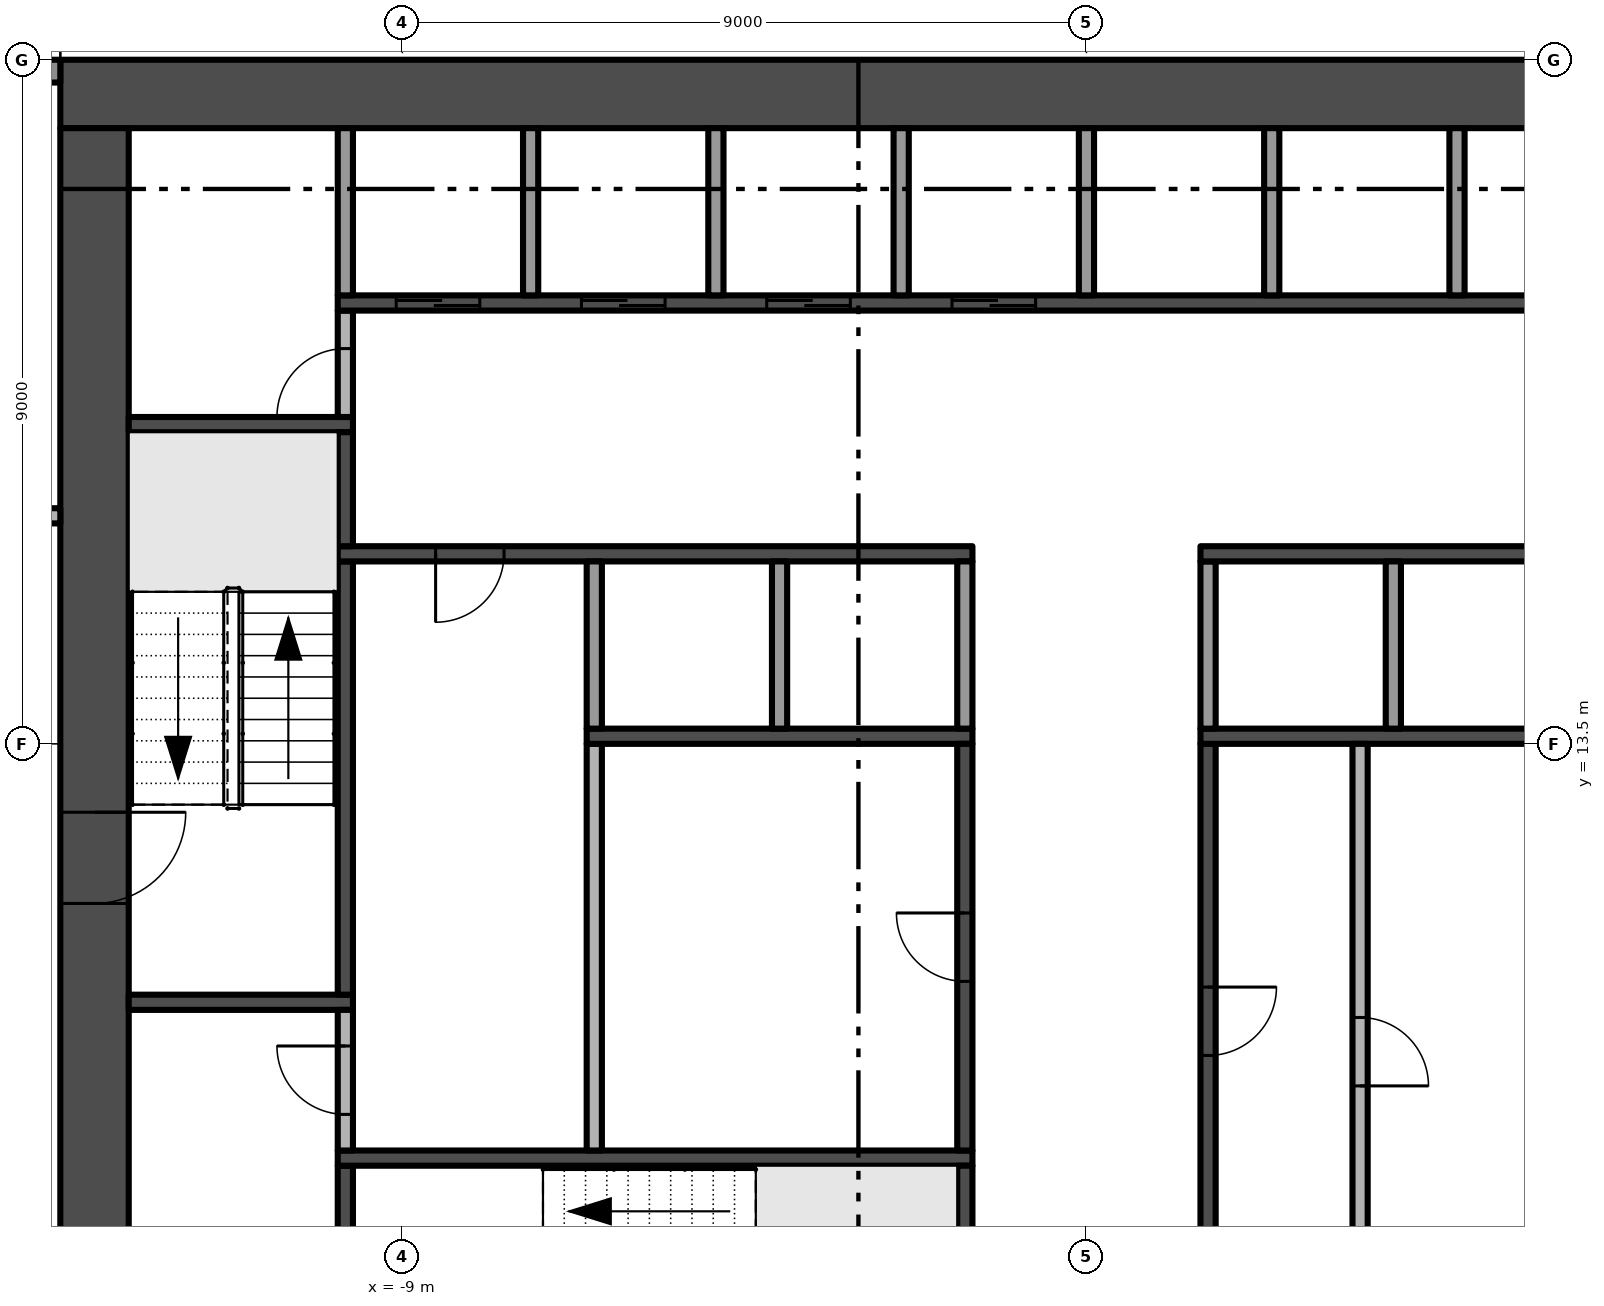
"""IFC4 building model, lengths in metres.
Left out: names, types, materials, properties, quantities, classifications, styles, units other than length and angle.
Written with IfcOpenShell. Run it as: python <this file> out.ifc"""

import sys

from ifc_helpers import new_model, si_unit, direction, frame, frame_2d, origin, place, context, subcontext, project, spatial, rectangle, extrude, element, fill, save


model = new_model("IFC4")
c1 = context("Model", 3, precision=1e-05, world=origin(), true_north=direction((0.0, 1.0)))
c2 = subcontext(c1, "Body", "Model", "MODEL_VIEW")
j1 = project(units=[si_unit("LENGTHUNIT", "METRE"), si_unit("PLANEANGLEUNIT", "RADIAN")], contexts=[c1])
p1 = place(None, origin())
s1 = spatial("IfcSite", under=j1, at=p1, CompositionType="ELEMENT")
p2 = place(p1, origin())
s2 = spatial("IfcBuilding", under=s1, at=p2, CompositionType="ELEMENT")
p3 = place(p2, frame((0.0, 0.0, 56.8)))
s3 = spatial("IfcBuildingStorey", under=s2, at=p3, CompositionType="ELEMENT", Elevation=56.8)
p4 = place(p3, frame((13.5, 22.05, -0.3), z_axis=(0.0, 0.0, 1.0), x_axis=(-1.0, 0.0, 0.0)))
e1 = element("IfcWall", 1, at=p4, inside=s3, PredefinedType="SHEAR", context=c2, shape_type="SweptSolid", body=[
    extrude(rectangle(XDim=27.0, YDim=0.9, at=frame_2d((13.5, 0.0))), origin(), (0.0, 0.0, 1.0), 3.8),
])
p5 = place(p3, frame((-13.05, 21.6, -0.3), z_axis=(0.0, 0.0, 1.0), x_axis=(0.0, -1.0, 0.0)))
e2 = element("IfcWall", 2, at=p5, inside=s3, PredefinedType="SHEAR", context=c2, shape_type="SweptSolid", body=[
    extrude(rectangle(XDim=16.2, YDim=0.9, at=frame_2d((8.1, 0.0))), origin(), (0.0, 0.0, 1.0), 3.8),
])
p6 = place(p5, frame((9.0, 0.0, 0.3)))
e3 = element("IfcOpeningElement", 3, at=p6, cuts=e2, PredefinedType="OPENING", context=c2, shape_type="SweptSolid", body=[
    extrude(rectangle(XDim=1.2, YDim=2.2, at=frame_2d((0.6, 1.1))), frame((0.0, 0.46, 0.0), z_axis=(0.0, -1.0, 0.0), x_axis=(1.0, 0.0, 0.0)), (0.0, 0.0, 1.0), 0.92),
])
p7 = place(p3, frame((-17.3, 22.35, 0.0), z_axis=(0.0, 0.0, 1.0), x_axis=(1.0, 0.0, 0.0)))
e4 = element("IfcWall", 4, at=p7, inside=s3, PredefinedType="SOLIDWALL", context=c2, shape_type="SweptSolid", body=[
    extrude(rectangle(XDim=3.8, YDim=0.3, at=frame_2d((1.9, 0.0))), origin(), (0.0, 0.0, 1.0), 3.5),
])
p8 = place(p7, frame((0.55, 0.0, 0.0)))
e5 = element("IfcOpeningElement", 5, at=p8, cuts=e4, PredefinedType="OPENING", context=c2, shape_type="SweptSolid", body=[
    extrude(rectangle(XDim=2.4, YDim=2.4, at=frame_2d((1.2, 1.2))), frame((0.0, 0.16, 0.0), z_axis=(0.0, -1.0, 0.0), x_axis=(1.0, 0.0, 0.0)), (0.0, 0.0, 1.0), 0.32),
])
for number, where, z_axis, x_axis in (
    (6, (-12.6, 10.1, 0.0), (0.0, 0.0, 1.0), (1.0, 0.0, 0.0)),
    (7, (-12.6, 17.7, 0.0), (0.0, 0.0, 1.0), (1.0, 0.0, 0.0)),
):
    element("IfcWall", number, at=place(p3, frame(where, z_axis=z_axis, x_axis=x_axis)), inside=s3, PredefinedType="SHEAR", context=c2, shape_type="SweptSolid", body=[
        extrude(rectangle(XDim=2.95, YDim=0.2, at=frame_2d((1.475, 0.0))), origin(), (0.0, 0.0, 1.0), 3.5),
    ])
p9 = place(p3, frame((-9.75, 5.4, 0.0), z_axis=(0.0, 0.0, 1.0), x_axis=(0.0, 1.0, 0.0)))
e8 = element("IfcWall", 8, at=p9, inside=s3, PredefinedType="SHEAR", context=c2, shape_type="SweptSolid", body=[
    extrude(rectangle(XDim=2.55, YDim=0.2, at=frame_2d((1.275, 0.0))), origin(), (0.0, 0.0, 1.0), 3.5),
])
p10 = place(p3, frame((-9.85, 8.05, 0.0), z_axis=(0.0, 0.0, 1.0), x_axis=(1.0, 0.0, 0.0)))
e9 = element("IfcWall", 9, at=p10, inside=s3, PredefinedType="SHEAR", context=c2, shape_type="SweptSolid", body=[
    extrude(rectangle(XDim=8.35, YDim=0.2, at=frame_2d((4.175, 0.0))), origin(), (0.0, 0.0, 1.0), 3.5),
])
p11 = place(p3, frame((-9.75, 8.15, 0.0), z_axis=(0.0, 0.0, 1.0), x_axis=(0.0, 1.0, 0.0)))
e10 = element("IfcWall", 10, at=p11, inside=s3, PredefinedType="PARTITIONING", context=c2, shape_type="SweptSolid", body=[
    extrude(rectangle(XDim=1.85, YDim=0.2, at=frame_2d((0.925, 0.0))), origin(), (0.0, 0.0, 1.0), 3.5),
])
p12 = place(p11, frame((0.475, 0.0, 0.0)))
e11 = element("IfcOpeningElement", 11, at=p12, cuts=e10, PredefinedType="OPENING", context=c2, shape_type="SweptSolid", body=[
    extrude(rectangle(XDim=0.9, YDim=2.1, at=frame_2d((0.45, 1.05))), frame((0.0, 0.11, 0.0), z_axis=(0.0, -1.0, 0.0), x_axis=(1.0, 0.0, 0.0)), (0.0, 0.0, 1.0), 0.22),
])
p13 = place(p3, frame((-9.75, 10.2, 0.0), z_axis=(0.0, 0.0, 1.0), x_axis=(0.0, 1.0, 0.0)))
e12 = element("IfcWall", 12, at=p13, inside=s3, PredefinedType="SHEAR", context=c2, shape_type="SweptSolid", body=[
    extrude(rectangle(XDim=5.7, YDim=0.2, at=frame_2d((2.85, 0.0))), origin(), (0.0, 0.0, 1.0), 3.5),
])
p14 = place(p3, frame((-1.5, 16.0, 0.0), z_axis=(0.0, 0.0, 1.0), x_axis=(-1.0, 0.0, 0.0)))
e13 = element("IfcWall", 13, at=p14, inside=s3, PredefinedType="SHEAR", context=c2, shape_type="SweptSolid", body=[
    extrude(rectangle(XDim=8.35, YDim=0.2, at=frame_2d((4.175, 0.0))), origin(), (0.0, 0.0, 1.0), 3.5),
])
p15 = place(p14, frame((6.162, 0.0, 0.0)))
e14 = element("IfcOpeningElement", 14, at=p15, cuts=e13, PredefinedType="OPENING", context=c2, shape_type="SweptSolid", body=[
    extrude(rectangle(XDim=0.9, YDim=2.1, at=frame_2d((0.45, 1.05))), frame((0.0, 0.11, 0.0), z_axis=(0.0, -1.0, 0.0), x_axis=(1.0, 0.0, 0.0)), (0.0, 0.0, 1.0), 0.22),
])
p16 = place(p3, frame((-9.75, 16.1, 0.0), z_axis=(0.0, 0.0, 1.0), x_axis=(0.0, 1.0, 0.0)))
e15 = element("IfcWall", 15, at=p16, inside=s3, PredefinedType="SHEAR", context=c2, shape_type="SweptSolid", body=[
    extrude(rectangle(XDim=1.5, YDim=0.2, at=frame_2d((0.75, 0.0))), origin(), (0.0, 0.0, 1.0), 3.5),
])
p17 = place(p3, frame((-9.75, 17.8, 0.0), z_axis=(0.0, 0.0, 1.0), x_axis=(0.0, 1.0, 0.0)))
e16 = element("IfcWall", 16, at=p17, inside=s3, PredefinedType="PARTITIONING", context=c2, shape_type="SweptSolid", body=[
    extrude(rectangle(XDim=1.4, YDim=0.2, at=frame_2d((0.7, 0.0))), origin(), (0.0, 0.0, 1.0), 3.5),
])
p18 = place(p17, origin())
e17 = element("IfcOpeningElement", 17, at=p18, cuts=e16, PredefinedType="OPENING", context=c2, shape_type="SweptSolid", body=[
    extrude(rectangle(XDim=0.9, YDim=2.1, at=frame_2d((0.45, 1.05))), frame((0.0, 0.11, 0.0), z_axis=(0.0, -1.0, 0.0), x_axis=(1.0, 0.0, 0.0)), (0.0, 0.0, 1.0), 0.22),
])
p19 = place(p3, frame((-9.85, 19.3, 0.0), z_axis=(0.0, 0.0, 1.0), x_axis=(1.0, 0.0, 0.0)))
e18 = element("IfcWall", 18, at=p19, inside=s3, PredefinedType="SHEAR", context=c2, shape_type="SweptSolid", body=[
    extrude(rectangle(XDim=19.7, YDim=0.2, at=frame_2d((9.85, 0.0))), origin(), (0.0, 0.0, 1.0), 3.5),
])
p20 = place(p19, frame((0.769, 0.0, 0.0)))
e19 = element("IfcOpeningElement", 19, at=p20, cuts=e18, PredefinedType="OPENING", context=c2, shape_type="SweptSolid", body=[
    extrude(rectangle(XDim=1.1, YDim=2.1, at=frame_2d((0.55, 1.05))), frame((0.0, 0.11, 0.0), z_axis=(0.0, -1.0, 0.0), x_axis=(1.0, 0.0, 0.0)), (0.0, 0.0, 1.0), 0.22),
])
p21 = place(p19, frame((3.206, 0.0, 0.0)))
e20 = element("IfcOpeningElement", 20, at=p21, cuts=e18, PredefinedType="OPENING", context=c2, shape_type="SweptSolid", body=[
    extrude(rectangle(XDim=1.1, YDim=2.1, at=frame_2d((0.55, 1.05))), frame((0.0, 0.11, 0.0), z_axis=(0.0, -1.0, 0.0), x_axis=(1.0, 0.0, 0.0)), (0.0, 0.0, 1.0), 0.22),
])
p22 = place(p19, frame((5.644, 0.0, 0.0)))
e21 = element("IfcOpeningElement", 21, at=p22, cuts=e18, PredefinedType="OPENING", context=c2, shape_type="SweptSolid", body=[
    extrude(rectangle(XDim=1.1, YDim=2.1, at=frame_2d((0.55, 1.05))), frame((0.0, 0.11, 0.0), z_axis=(0.0, -1.0, 0.0), x_axis=(1.0, 0.0, 0.0)), (0.0, 0.0, 1.0), 0.22),
])
p23 = place(p19, frame((8.081, 0.0, 0.0)))
e22 = element("IfcOpeningElement", 22, at=p23, cuts=e18, PredefinedType="OPENING", context=c2, shape_type="SweptSolid", body=[
    extrude(rectangle(XDim=1.1, YDim=2.1, at=frame_2d((0.55, 1.05))), frame((0.0, 0.11, 0.0), z_axis=(0.0, -1.0, 0.0), x_axis=(1.0, 0.0, 0.0)), (0.0, 0.0, 1.0), 0.22),
])
for number, where, z_axis, x_axis in (
    (23, (-9.75, 19.4, 0.0), (0.0, 0.0, 1.0), (0.0, 1.0, 0.0)),
    (24, (-7.312, 19.4, 0.0), (0.0, 0.0, 1.0), (0.0, 1.0, 0.0)),
):
    element("IfcWall", number, at=place(p3, frame(where, z_axis=z_axis, x_axis=x_axis)), inside=s3, PredefinedType="PARTITIONING", context=c2, shape_type="SweptSolid", body=[
        extrude(rectangle(XDim=2.2, YDim=0.2, at=frame_2d((1.1, 0.0))), origin(), (0.0, 0.0, 1.0), 3.5),
    ])
p24 = place(p3, frame((-6.475, 8.15, 0.0), z_axis=(0.0, 0.0, 1.0), x_axis=(0.0, 1.0, 0.0)))
e25 = element("IfcWall", 25, at=p24, inside=s3, PredefinedType="PARTITIONING", context=c2, shape_type="SweptSolid", body=[
    extrude(rectangle(XDim=5.35, YDim=0.2, at=frame_2d((2.675, 0.0))), origin(), (0.0, 0.0, 1.0), 3.5),
])
p25 = place(p3, frame((-6.575, 13.6, 0.0), z_axis=(0.0, 0.0, 1.0), x_axis=(1.0, 0.0, 0.0)))
e26 = element("IfcWall", 26, at=p25, inside=s3, PredefinedType="SHEAR", context=c2, shape_type="SweptSolid", body=[
    extrude(rectangle(XDim=5.075, YDim=0.2, at=frame_2d((2.538, 0.0))), origin(), (0.0, 0.0, 1.0), 3.5),
])
for number, where, z_axis, x_axis in (
    (27, (-6.475, 13.7, 0.0), (0.0, 0.0, 1.0), (0.0, 1.0, 0.0)),
    (28, (-4.875, 19.4, 0.0), (0.0, 0.0, 1.0), (0.0, 1.0, 0.0)),
    (29, (-4.037, 13.7, 0.0), (0.0, 0.0, 1.0), (0.0, 1.0, 0.0)),
    (30, (-2.438, 19.4, 0.0), (0.0, 0.0, 1.0), (0.0, 1.0, 0.0)),
):
    element("IfcWall", number, at=place(p3, frame(where, z_axis=z_axis, x_axis=x_axis)), inside=s3, PredefinedType="PARTITIONING", context=c2, shape_type="SweptSolid", body=[
        extrude(rectangle(XDim=2.2, YDim=0.2, at=frame_2d((1.1, 0.0))), origin(), (0.0, 0.0, 1.0), 3.5),
    ])
p26 = place(p3, frame((-1.6, 5.4, 0.0), z_axis=(0.0, 0.0, 1.0), x_axis=(0.0, 1.0, 0.0)))
e31 = element("IfcWall", 31, at=p26, inside=s3, PredefinedType="SHEAR", context=c2, shape_type="SweptSolid", body=[
    extrude(rectangle(XDim=2.55, YDim=0.2, at=frame_2d((1.275, 0.0))), origin(), (0.0, 0.0, 1.0), 3.5),
])
p27 = place(p3, frame((-1.6, 8.15, 0.0), z_axis=(0.0, 0.0, 1.0), x_axis=(0.0, 1.0, 0.0)))
e32 = element("IfcWall", 32, at=p27, inside=s3, PredefinedType="SHEAR", context=c2, shape_type="SweptSolid", body=[
    extrude(rectangle(XDim=5.35, YDim=0.2, at=frame_2d((2.675, 0.0))), origin(), (0.0, 0.0, 1.0), 3.5),
])
p28 = place(p27, frame((2.225, 0.0, 0.0)))
e33 = element("IfcOpeningElement", 33, at=p28, cuts=e32, PredefinedType="OPENING", context=c2, shape_type="SweptSolid", body=[
    extrude(rectangle(XDim=0.9, YDim=2.1, at=frame_2d((0.45, 1.05))), frame((0.0, 0.11, 0.0), z_axis=(0.0, -1.0, 0.0), x_axis=(1.0, 0.0, 0.0)), (0.0, 0.0, 1.0), 0.22),
])
for number, where, z_axis, x_axis in (
    (34, (-1.6, 13.7, 0.0), (0.0, 0.0, 1.0), (0.0, 1.0, 0.0)),
    (35, (0.0, 19.4, 0.0), (0.0, 0.0, 1.0), (0.0, 1.0, 0.0)),
):
    element("IfcWall", number, at=place(p3, frame(where, z_axis=z_axis, x_axis=x_axis)), inside=s3, PredefinedType="PARTITIONING", context=c2, shape_type="SweptSolid", body=[
        extrude(rectangle(XDim=2.2, YDim=0.2, at=frame_2d((1.1, 0.0))), origin(), (0.0, 0.0, 1.0), 3.5),
    ])
p29 = place(p3, frame((1.6, 13.5, 0.0), z_axis=(0.0, 0.0, 1.0), x_axis=(0.0, -1.0, 0.0)))
e36 = element("IfcWall", 36, at=p29, inside=s3, PredefinedType="SHEAR", context=c2, shape_type="SweptSolid", body=[
    extrude(rectangle(XDim=8.1, YDim=0.2, at=frame_2d((4.05, 0.0))), origin(), (0.0, 0.0, 1.0), 3.5),
])
p30 = place(p29, frame((3.2, 0.0, 0.0)))
e37 = element("IfcOpeningElement", 37, at=p30, cuts=e36, PredefinedType="OPENING", context=c2, shape_type="SweptSolid", body=[
    extrude(rectangle(XDim=0.9, YDim=2.1, at=frame_2d((0.45, 1.05))), frame((0.0, 0.11, 0.0), z_axis=(0.0, -1.0, 0.0), x_axis=(1.0, 0.0, 0.0)), (0.0, 0.0, 1.0), 0.22),
])
p31 = place(p3, frame((1.5, 13.6, 0.0), z_axis=(0.0, 0.0, 1.0), x_axis=(1.0, 0.0, 0.0)))
e38 = element("IfcWall", 38, at=p31, inside=s3, PredefinedType="SHEAR", context=c2, shape_type="SweptSolid", body=[
    extrude(rectangle(XDim=5.075, YDim=0.2, at=frame_2d((2.538, 0.0))), origin(), (0.0, 0.0, 1.0), 3.5),
])
p32 = place(p3, frame((1.6, 13.7, 0.0), z_axis=(0.0, 0.0, 1.0), x_axis=(0.0, 1.0, 0.0)))
e39 = element("IfcWall", 39, at=p32, inside=s3, PredefinedType="PARTITIONING", context=c2, shape_type="SweptSolid", body=[
    extrude(rectangle(XDim=2.2, YDim=0.2, at=frame_2d((1.1, 0.0))), origin(), (0.0, 0.0, 1.0), 3.5),
])
p33 = place(p3, frame((9.85, 16.0, 0.0), z_axis=(0.0, 0.0, 1.0), x_axis=(-1.0, 0.0, 0.0)))
e40 = element("IfcWall", 40, at=p33, inside=s3, PredefinedType="SHEAR", context=c2, shape_type="SweptSolid", body=[
    extrude(rectangle(XDim=8.35, YDim=0.2, at=frame_2d((4.175, 0.0))), origin(), (0.0, 0.0, 1.0), 3.5),
])
p34 = place(p33, frame((1.288, 0.0, 0.0)))
e41 = element("IfcOpeningElement", 41, at=p34, cuts=e40, PredefinedType="OPENING", context=c2, shape_type="SweptSolid", body=[
    extrude(rectangle(XDim=0.9, YDim=2.1, at=frame_2d((0.45, 1.05))), frame((0.0, 0.11, 0.0), z_axis=(0.0, -1.0, 0.0), x_axis=(1.0, 0.0, 0.0)), (0.0, 0.0, 1.0), 0.22),
])
p35 = place(p3, frame((2.438, 19.4, 0.0), z_axis=(0.0, 0.0, 1.0), x_axis=(0.0, 1.0, 0.0)))
e42 = element("IfcWall", 42, at=p35, inside=s3, PredefinedType="PARTITIONING", context=c2, shape_type="SweptSolid", body=[
    extrude(rectangle(XDim=2.2, YDim=0.2, at=frame_2d((1.1, 0.0))), origin(), (0.0, 0.0, 1.0), 3.5),
])
p36 = place(p3, frame((3.6, 13.5, 0.0), z_axis=(0.0, 0.0, 1.0), x_axis=(0.0, -1.0, 0.0)))
e43 = element("IfcWall", 43, at=p36, inside=s3, PredefinedType="PARTITIONING", context=c2, shape_type="SweptSolid", body=[
    extrude(rectangle(XDim=8.1, YDim=0.2, at=frame_2d((4.05, 0.0))), origin(), (0.0, 0.0, 1.0), 3.5),
])
p37 = place(p36, frame((3.6, 0.0, 0.0)))
e44 = element("IfcOpeningElement", 44, at=p37, cuts=e43, PredefinedType="OPENING", context=c2, shape_type="SweptSolid", body=[
    extrude(rectangle(XDim=0.9, YDim=2.1, at=frame_2d((0.45, 1.05))), frame((0.0, 0.11, 0.0), z_axis=(0.0, -1.0, 0.0), x_axis=(1.0, 0.0, 0.0)), (0.0, 0.0, 1.0), 0.22),
])
for number, where, z_axis, x_axis in (
    (45, (4.037, 13.7, 0.0), (0.0, 0.0, 1.0), (0.0, 1.0, 0.0)),
    (46, (4.875, 19.4, 0.0), (0.0, 0.0, 1.0), (0.0, 1.0, 0.0)),
):
    element("IfcWall", number, at=place(p3, frame(where, z_axis=z_axis, x_axis=x_axis)), inside=s3, PredefinedType="PARTITIONING", context=c2, shape_type="SweptSolid", body=[
        extrude(rectangle(XDim=2.2, YDim=0.2, at=frame_2d((1.1, 0.0))), origin(), (0.0, 0.0, 1.0), 3.5),
    ])
p38 = place(p3, frame((-17.325, 16.5, 0.0), z_axis=(0.0, 0.0, 1.0), x_axis=(1.0, 0.0, 0.0)))
e47 = element("IfcWall", 47, at=p38, inside=s3, PredefinedType="PARTITIONING", context=c2, shape_type="SweptSolid", body=[
    extrude(rectangle(XDim=3.825, YDim=0.2, at=frame_2d((1.913, 0.0))), origin(), (0.0, 0.0, 1.0), 3.5),
])
p39 = place(p38, frame((1.35, 0.0, 0.0)))
e48 = element("IfcOpeningElement", 48, at=p39, cuts=e47, PredefinedType="OPENING", context=c2, shape_type="SweptSolid", body=[
    extrude(rectangle(XDim=0.9, YDim=2.1, at=frame_2d((0.45, 1.05))), frame((0.0, 0.11, 0.0), z_axis=(0.0, -1.0, 0.0), x_axis=(1.0, 0.0, 0.0)), (0.0, 0.0, 1.0), 0.22),
])
p40 = place(p6, frame((1.2, 0.0, 0.0), z_axis=(0.0, 0.0, 1.0), x_axis=(-1.0, 0.0, 0.0)))
e49 = element("IfcDoor", 49, at=p40, inside=s3, OperationType="SINGLE_SWING_RIGHT", PredefinedType="DOOR", context=c2, shape_type="SweptSolid", body=[
    extrude(rectangle(XDim=1.2, YDim=2.2, at=frame_2d((0.6, 1.1))), frame((0.0, 0.025, 0.0), z_axis=(0.0, -1.0, 0.0), x_axis=(1.0, 0.0, 0.0)), (0.0, 0.0, 1.0), 0.05),
])
fill(e3, e49)
p41 = place(p20, origin())
e50 = element("IfcDoor", 50, at=p41, inside=s3, OperationType="SLIDING_TO_LEFT", PredefinedType="DOOR", context=c2, shape_type="SweptSolid", body=[
    extrude(rectangle(XDim=1.1, YDim=2.1, at=frame_2d((0.55, 1.05))), frame((0.0, 0.025, 0.0), z_axis=(0.0, -1.0, 0.0), x_axis=(1.0, 0.0, 0.0)), (0.0, 0.0, 1.0), 0.05),
])
fill(e19, e50)
p42 = place(p21, origin())
e51 = element("IfcDoor", 51, at=p42, inside=s3, OperationType="SLIDING_TO_LEFT", PredefinedType="DOOR", context=c2, shape_type="SweptSolid", body=[
    extrude(rectangle(XDim=1.1, YDim=2.1, at=frame_2d((0.55, 1.05))), frame((0.0, 0.025, 0.0), z_axis=(0.0, -1.0, 0.0), x_axis=(1.0, 0.0, 0.0)), (0.0, 0.0, 1.0), 0.05),
])
fill(e20, e51)
p43 = place(p22, origin())
e52 = element("IfcDoor", 52, at=p43, inside=s3, OperationType="SLIDING_TO_LEFT", PredefinedType="DOOR", context=c2, shape_type="SweptSolid", body=[
    extrude(rectangle(XDim=1.1, YDim=2.1, at=frame_2d((0.55, 1.05))), frame((0.0, 0.025, 0.0), z_axis=(0.0, -1.0, 0.0), x_axis=(1.0, 0.0, 0.0)), (0.0, 0.0, 1.0), 0.05),
])
fill(e21, e52)
p44 = place(p23, origin())
e53 = element("IfcDoor", 53, at=p44, inside=s3, OperationType="SLIDING_TO_LEFT", PredefinedType="DOOR", context=c2, shape_type="SweptSolid", body=[
    extrude(rectangle(XDim=1.1, YDim=2.1, at=frame_2d((0.55, 1.05))), frame((0.0, 0.025, 0.0), z_axis=(0.0, -1.0, 0.0), x_axis=(1.0, 0.0, 0.0)), (0.0, 0.0, 1.0), 0.05),
])
fill(e22, e53)
p45 = place(p15, origin())
e54 = element("IfcDoor", 54, at=p45, inside=s3, OperationType="SINGLE_SWING_RIGHT", PredefinedType="DOOR", context=c2, shape_type="SweptSolid", body=[
    extrude(rectangle(XDim=0.9, YDim=2.1, at=frame_2d((0.45, 1.05))), frame((0.0, 0.025, 0.0), z_axis=(0.0, -1.0, 0.0), x_axis=(1.0, 0.0, 0.0)), (0.0, 0.0, 1.0), 0.05),
])
fill(e14, e54)
p46 = place(p28, origin())
e55 = element("IfcDoor", 55, at=p46, inside=s3, OperationType="SINGLE_SWING_RIGHT", PredefinedType="DOOR", context=c2, shape_type="SweptSolid", body=[
    extrude(rectangle(XDim=0.9, YDim=2.1, at=frame_2d((0.45, 1.05))), frame((0.0, 0.025, 0.0), z_axis=(0.0, -1.0, 0.0), x_axis=(1.0, 0.0, 0.0)), (0.0, 0.0, 1.0), 0.05),
])
fill(e33, e55)
p47 = place(p30, origin())
e56 = element("IfcDoor", 56, at=p47, inside=s3, OperationType="SINGLE_SWING_LEFT", PredefinedType="DOOR", context=c2, shape_type="SweptSolid", body=[
    extrude(rectangle(XDim=0.9, YDim=2.1, at=frame_2d((0.45, 1.05))), frame((0.0, 0.025, 0.0), z_axis=(0.0, -1.0, 0.0), x_axis=(1.0, 0.0, 0.0)), (0.0, 0.0, 1.0), 0.05),
])
fill(e37, e56)
p48 = place(p18, origin())
e57 = element("IfcDoor", 57, at=p48, inside=s3, OperationType="SINGLE_SWING_LEFT", PredefinedType="DOOR", context=c2, shape_type="SweptSolid", body=[
    extrude(rectangle(XDim=0.9, YDim=2.1, at=frame_2d((0.45, 1.05))), frame((0.0, 0.025, 0.0), z_axis=(0.0, -1.0, 0.0), x_axis=(1.0, 0.0, 0.0)), (0.0, 0.0, 1.0), 0.05),
])
fill(e17, e57)
p49 = place(p12, origin())
e58 = element("IfcDoor", 58, at=p49, inside=s3, OperationType="SINGLE_SWING_RIGHT", PredefinedType="DOOR", context=c2, shape_type="SweptSolid", body=[
    extrude(rectangle(XDim=0.9, YDim=2.1, at=frame_2d((0.45, 1.05))), frame((0.0, 0.025, 0.0), z_axis=(0.0, -1.0, 0.0), x_axis=(1.0, 0.0, 0.0)), (0.0, 0.0, 1.0), 0.05),
])
fill(e11, e58)
p50 = place(p37, origin())
e59 = element("IfcDoor", 59, at=p50, inside=s3, OperationType="SINGLE_SWING_RIGHT", PredefinedType="DOOR", context=c2, shape_type="SweptSolid", body=[
    extrude(rectangle(XDim=0.9, YDim=2.1, at=frame_2d((0.45, 1.05))), frame((0.0, 0.025, 0.0), z_axis=(0.0, -1.0, 0.0), x_axis=(1.0, 0.0, 0.0)), (0.0, 0.0, 1.0), 0.05),
])
fill(e44, e59)
save(model, sys.argv[1])
